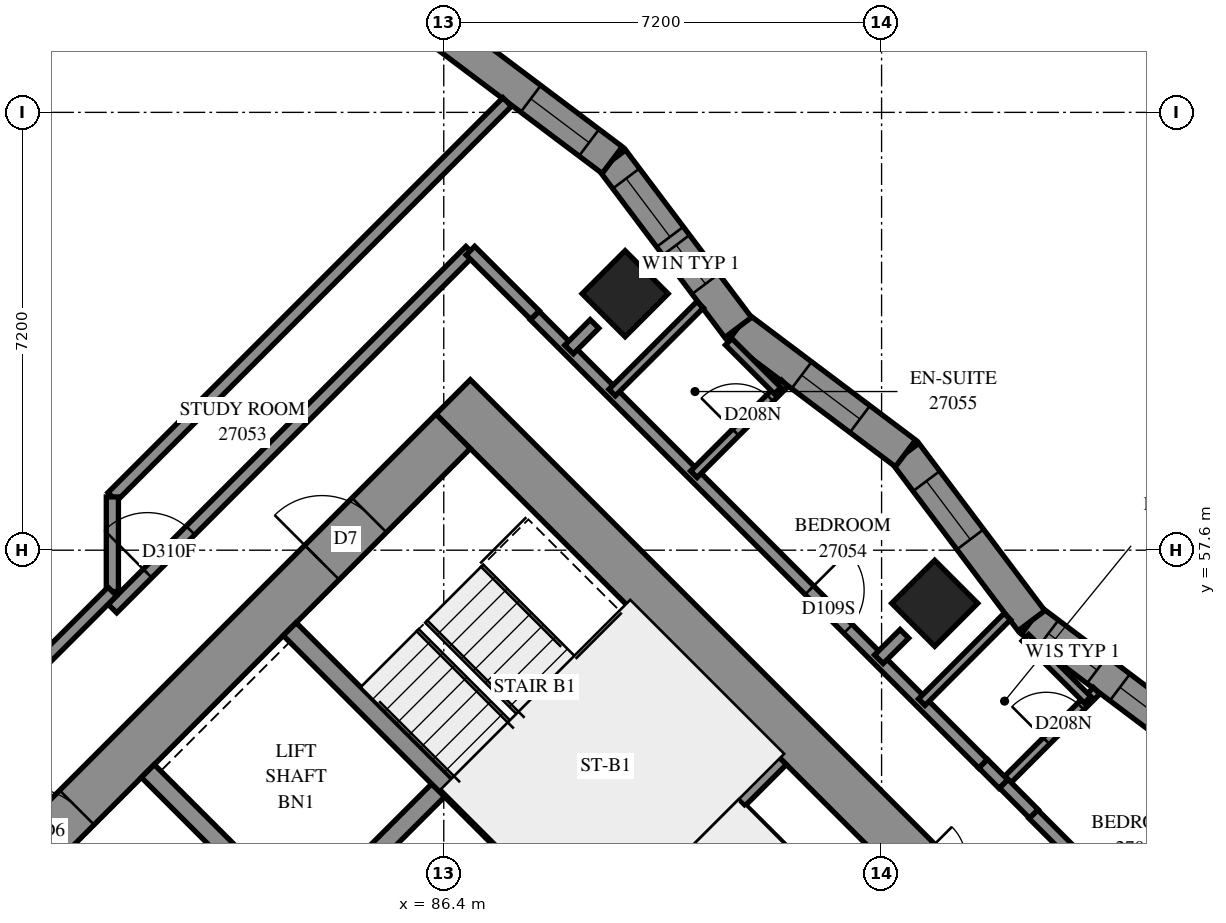
"""IFC4 building model, lengths in metres.
Left out: names, types, materials, properties, quantities, classifications, styles, units other than length and angle.
Written with IfcOpenShell. Run it as: python <this file> out.ifc"""

import sys

from ifc_helpers import new_model, si_unit, direction, frame, frame_2d, origin, origin_2d, place, context, subcontext, project, spatial, polyline, rectangle, outline, extrude, element, fill, save


model = new_model("IFC4")
c1 = context("Model", 3, precision=1e-05, world=origin(), true_north=direction((0.0, 1.0)))
c2 = subcontext(c1, "Body", "Model", "MODEL_VIEW")
j1 = project(units=[si_unit("LENGTHUNIT", "METRE"), si_unit("PLANEANGLEUNIT", "RADIAN")], contexts=[c1])
p1 = place(None, origin())
s1 = spatial("IfcSite", under=j1, at=p1, CompositionType="ELEMENT")
p2 = place(p1, origin())
s2 = spatial("IfcBuilding", under=s1, at=p2, CompositionType="ELEMENT")
p3 = place(p2, frame((0.0, 0.0, 101.6)))
s3 = spatial("IfcBuildingStorey", under=s2, at=p3, CompositionType="ELEMENT", Elevation=101.6)
for number, where, z_axis, x_axis in (
    (1, (89.382, 61.818, 0.0), (0.0, 0.0, 1.0), (0.707, -0.707, 0.0)),
    (2, (94.474, 56.727, 0.0), (0.0, 0.0, 1.0), (0.707, -0.707, 0.0)),
):
    element("IfcColumn", number, at=place(p3, frame(where, z_axis=z_axis, x_axis=x_axis)), inside=s3, PredefinedType="COLUMN", context=c2, shape_type="SweptSolid", body=[
        extrude(rectangle(XDim=1.0, YDim=1.0, at=origin_2d()), origin(), (0.0, 0.0, 1.0), 3.1),
    ])
p4 = place(p3, frame((86.554, 60.121, -0.3), z_axis=(0.0, 0.0, 1.0), x_axis=(0.7071067812, -0.7071067812, 0.0)))
e3 = element("IfcWall", 3, at=p4, inside=s3, PredefinedType="SHEAR", context=c2, shape_type="SweptSolid", body=[
    extrude(rectangle(XDim=16.0, YDim=0.8, at=frame_2d((8.0, 0.0))), origin(), (0.0, 0.0, 1.0), 2.7),
])
p5 = place(p4, frame((10.8, 0.0, 0.3)))
e4 = element("IfcOpeningElement", 4, at=p5, cuts=e3, PredefinedType="OPENING", context=c2, shape_type="SweptSolid", body=[
    extrude(rectangle(XDim=0.8, YDim=2.1, at=frame_2d((0.4, 1.05))), frame((0.0, 0.41, 0.0), z_axis=(0.0, -1.0, 0.0), x_axis=(1.0, 0.0, 0.0)), (0.0, 0.0, 1.0), 0.82),
])
p6 = place(p3, frame((76.372, 49.373, -0.3), z_axis=(0.0, 0.0, 1.0), x_axis=(0.7071067812, 0.7071067812, 0.0)))
e5 = element("IfcWall", 5, at=p6, inside=s3, PredefinedType="SHEAR", context=c2, shape_type="SweptSolid", body=[
    extrude(rectangle(XDim=14.4, YDim=0.8, at=frame_2d((7.2, 0.0))), origin(), (0.0, 0.0, 1.0), 2.7),
])
p7 = place(p6, frame((4.55, 0.0, 0.3)))
e6 = element("IfcOpeningElement", 6, at=p7, cuts=e5, PredefinedType="OPENING", context=c2, shape_type="SweptSolid", body=[
    extrude(rectangle(XDim=1.1, YDim=2.1, at=frame_2d((0.55, 1.05))), frame((0.0, 0.41, 0.0), z_axis=(0.0, -1.0, 0.0), x_axis=(1.0, 0.0, 0.0)), (0.0, 0.0, 1.0), 0.82),
])
p8 = place(p6, frame((11.35, 0.0, 0.3)))
e7 = element("IfcOpeningElement", 7, at=p8, cuts=e5, PredefinedType="OPENING", context=c2, shape_type="SweptSolid", body=[
    extrude(rectangle(XDim=1.1, YDim=2.1, at=frame_2d((0.55, 1.05))), frame((0.0, 0.41, 0.0), z_axis=(0.0, -1.0, 0.0), x_axis=(1.0, 0.0, 0.0)), (0.0, 0.0, 1.0), 0.82),
])
p9 = place(p3, frame((84.079, 51.423, 0.0), z_axis=(0.0, 0.0, 1.0), x_axis=(0.7071219326, 0.7070916295, 0.0)))
e8 = element("IfcWall", 8, at=p9, inside=s3, PredefinedType="SOLIDWALL", context=c2, shape_type="SweptSolid", body=[
    extrude(rectangle(XDim=3.3, YDim=0.3, at=frame_2d((1.65, 0.0))), origin(), (0.0, 0.0, 1.0), 3.1),
])
p10 = place(p3, frame((81.534, 53.969, 0.0), z_axis=(0.0, 0.0, 1.0), x_axis=(0.707103309, -0.7071102534, 0.0)))
e9 = element("IfcWall", 9, at=p10, inside=s3, PredefinedType="SOLIDWALL", context=c2, shape_type="SweptSolid", body=[
    extrude(rectangle(XDim=14.4, YDim=0.3, at=frame_2d((7.2, 0.0))), origin(), (0.0, 0.0, 1.0), 3.1),
])
p11 = place(p10, frame((12.05, 0.0, 0.0)))
e10 = element("IfcOpeningElement", 10, at=p11, cuts=e9, PredefinedType="OPENING", context=c2, shape_type="SweptSolid", body=[
    extrude(rectangle(XDim=1.1, YDim=2.1, at=frame_2d((0.55, 1.05))), frame((0.0, 0.16, 0.0), z_axis=(0.0, -1.0, 0.0), x_axis=(1.0, 0.0, 0.0)), (0.0, 0.0, 1.0), 0.32),
])
p12 = place(p3, frame((83.867, 56.302, 0.0), z_axis=(0.0, 0.0, 1.0), x_axis=(0.7071137256, -0.7070998367, 0.0)))
e11 = element("IfcWall", 11, at=p12, inside=s3, PredefinedType="SOLIDWALL", context=c2, shape_type="SweptSolid", body=[
    extrude(rectangle(XDim=7.2, YDim=0.3, at=frame_2d((3.6, 0.0))), origin(), (0.0, 0.0, 1.0), 3.1),
])
p13 = place(p3, frame((88.958, 51.211, 0.0), z_axis=(0.0, 0.0, 1.0), x_axis=(0.7071067812, 0.7071067812, 0.0)))
e12 = element("IfcWall", 12, at=p13, inside=s3, PredefinedType="SOLIDWALL", context=c2, shape_type="SweptSolid", body=[
    extrude(rectangle(XDim=4.2, YDim=0.3, at=frame_2d((2.1, 0.0))), origin(), (0.0, 0.0, 1.0), 3.1),
])
p14 = place(p3, frame((98.817, 54.369, 0.0), z_axis=(0.0, 0.0, 1.0), x_axis=(-0.7990967254, 0.6012024813, 0.0)))
e13 = element("IfcWall", 13, at=p14, inside=s3, PredefinedType="SOLIDWALL", context=c2, shape_type="SweptSolid", body=[
    extrude(outline(polyline([(-0.039, -0.275), (3.405, -0.275), (3.483, 0.275), (0.039, 0.275), (-0.039, -0.275)])), origin(), (0.0, 0.0, 1.0), 3.1),
])
p15 = place(p14, frame((0.423, 0.0, 0.5)))
e14 = element("IfcOpeningElement", 14, at=p15, cuts=e13, PredefinedType="OPENING", context=c2, shape_type="SweptSolid", body=[
    extrude(rectangle(XDim=1.2, YDim=2.45, at=frame_2d((0.6, 1.225))), frame((0.0, 0.285, 0.0), z_axis=(0.0, -1.0, 0.0), x_axis=(1.0, 0.0, 0.0)), (0.0, 0.0, 1.0), 0.57),
])
p16 = place(p14, frame((2.095, 0.0, 0.45)))
e15 = element("IfcOpeningElement", 15, at=p16, cuts=e13, PredefinedType="OPENING", context=c2, shape_type="SweptSolid", body=[
    extrude(rectangle(XDim=1.0, YDim=2.5, at=frame_2d((0.5, 1.25))), frame((0.0, 0.285, 0.0), z_axis=(0.0, -1.0, 0.0), x_axis=(1.0, 0.0, 0.0)), (0.0, 0.0, 1.0), 0.57),
])
p17 = place(p3, frame((96.064, 56.44, 0.0), z_axis=(0.0, 0.0, 1.0), x_axis=(-0.6012024813, 0.7990967254, 0.0)))
e16 = element("IfcWall", 16, at=p17, inside=s3, PredefinedType="SOLIDWALL", context=c2, shape_type="SweptSolid", body=[
    extrude(outline(polyline([(0.039, -0.275), (3.483, -0.275), (3.405, 0.275), (-0.039, 0.275), (0.039, -0.275)])), origin(), (0.0, 0.0, 1.0), 3.1),
])
p18 = place(p17, frame((1.673, 0.0, 0.5)))
e17 = element("IfcOpeningElement", 17, at=p18, cuts=e16, PredefinedType="OPENING", context=c2, shape_type="SweptSolid", body=[
    extrude(rectangle(XDim=1.2, YDim=2.45, at=frame_2d((0.6, 1.225))), frame((0.0, 0.285, 0.0), z_axis=(0.0, -1.0, 0.0), x_axis=(1.0, 0.0, 0.0)), (0.0, 0.0, 1.0), 0.57),
])
p19 = place(p3, frame((93.994, 59.192, 0.0), z_axis=(0.0, 0.0, 1.0), x_axis=(-0.7990967254, 0.6012024813, 0.0)))
e18 = element("IfcWall", 18, at=p19, inside=s3, PredefinedType="SOLIDWALL", context=c2, shape_type="SweptSolid", body=[
    extrude(outline(polyline([(-0.039, -0.275), (3.405, -0.275), (3.483, 0.275), (0.039, 0.275), (-0.039, -0.275)])), origin(), (0.0, 0.0, 1.0), 3.1),
])
p20 = place(p19, frame((0.938, 0.0, 0.5)))
e19 = element("IfcOpeningElement", 19, at=p20, cuts=e18, PredefinedType="OPENING", context=c2, shape_type="SweptSolid", body=[
    extrude(rectangle(XDim=1.2, YDim=2.45, at=frame_2d((0.6, 1.225))), frame((0.0, 0.285, 0.0), z_axis=(0.0, -1.0, 0.0), x_axis=(1.0, 0.0, 0.0)), (0.0, 0.0, 1.0), 0.57),
])
p21 = place(p3, frame((91.241, 61.263, 0.0), z_axis=(0.0, 0.0, 1.0), x_axis=(-0.6012024813, 0.7990967254, 0.0)))
e20 = element("IfcWall", 20, at=p21, inside=s3, PredefinedType="SOLIDWALL", context=c2, shape_type="SweptSolid", body=[
    extrude(outline(polyline([(0.039, -0.275), (3.483, -0.275), (3.405, 0.275), (-0.039, 0.275), (0.039, -0.275)])), origin(), (0.0, 0.0, 1.0), 3.1),
])
p22 = place(p21, frame((1.865, 0.0, 0.5)))
e21 = element("IfcOpeningElement", 21, at=p22, cuts=e20, PredefinedType="OPENING", context=c2, shape_type="SweptSolid", body=[
    extrude(rectangle(XDim=1.2, YDim=2.45, at=frame_2d((0.6, 1.225))), frame((0.0, 0.285, 0.0), z_axis=(0.0, -1.0, 0.0), x_axis=(1.0, 0.0, 0.0)), (0.0, 0.0, 1.0), 0.57),
])
p23 = place(p21, frame((0.895, 0.0, 0.45)))
e22 = element("IfcOpeningElement", 22, at=p23, cuts=e20, PredefinedType="OPENING", context=c2, shape_type="SweptSolid", body=[
    extrude(rectangle(XDim=0.8, YDim=2.5, at=frame_2d((0.4, 1.25))), frame((0.0, 0.285, 0.0), z_axis=(0.0, -1.0, 0.0), x_axis=(1.0, 0.0, 0.0)), (0.0, 0.0, 1.0), 0.57),
])
p24 = place(p3, frame((89.171, 64.015, 0.0), z_axis=(0.0, 0.0, 1.0), x_axis=(-0.7990967254, 0.6012024813, 0.0)))
e23 = element("IfcWall", 23, at=p24, inside=s3, PredefinedType="SOLIDWALL", context=c2, shape_type="SweptSolid", body=[
    extrude(outline(polyline([(-0.039, -0.275), (3.405, -0.275), (3.483, 0.275), (0.039, 0.275), (-0.039, -0.275)])), origin(), (0.0, 0.0, 1.0), 3.1),
])
p25 = place(p24, frame((0.477, 0.0, 0.5)))
e24 = element("IfcOpeningElement", 24, at=p25, cuts=e23, PredefinedType="OPENING", context=c2, shape_type="SweptSolid", body=[
    extrude(rectangle(XDim=1.2, YDim=2.45, at=frame_2d((0.6, 1.225))), frame((0.0, 0.285, 0.0), z_axis=(0.0, -1.0, 0.0), x_axis=(1.0, 0.0, 0.0)), (0.0, 0.0, 1.0), 0.57),
])
p26 = place(p3, frame((91.313, 53.354, 0.0), z_axis=(0.0, 0.0, 1.0), x_axis=(0.7071067812, -0.7071067812, 0.0)))
e25 = element("IfcWall", 25, at=p26, inside=s3, PredefinedType="PARTITIONING", context=c2, shape_type="SweptSolid", body=[
    extrude(rectangle(XDim=5.95, YDim=0.15, at=frame_2d((2.975, 0.0))), origin(), (0.0, 0.0, 1.0), 3.1),
])
p27 = place(p3, frame((87.894, 61.461, 0.0), z_axis=(0.0, 0.0, 1.0), x_axis=(0.7071067812, -0.7071067812, 0.0)))
e26 = element("IfcWall", 26, at=p27, inside=s3, PredefinedType="PARTITIONING", context=c2, shape_type="SweptSolid", body=[
    extrude(rectangle(XDim=10.428, YDim=0.2, at=frame_2d((5.214, 0.0))), origin(), (0.0, 0.0, 1.0), 3.1),
])
p28 = place(p27, frame((6.39, 0.0, 0.0)))
e27 = element("IfcOpeningElement", 27, at=p28, cuts=e26, PredefinedType="OPENING", context=c2, shape_type="SweptSolid", body=[
    extrude(rectangle(XDim=0.9, YDim=2.1, at=frame_2d((0.45, 1.05))), frame((0.0, 0.11, 0.0), z_axis=(0.0, -1.0, 0.0), x_axis=(1.0, 0.0, 0.0)), (0.0, 0.0, 1.0), 0.22),
])
p29 = place(p3, frame((80.949, 58.477, 0.0), z_axis=(0.0, 0.0, 1.0), x_axis=(0.7071122255, 0.7071013368, 0.0)))
e28 = element("IfcWall", 28, at=p29, inside=s3, PredefinedType="PARTITIONING", context=c2, shape_type="SweptSolid", body=[
    extrude(rectangle(XDim=9.184, YDim=0.2, at=frame_2d((4.592, 0.0))), origin(), (0.0, 0.0, 1.0), 3.1),
])
p30 = place(p3, frame((80.951, 56.641, 0.0), z_axis=(0.0, 0.0, 1.0), x_axis=(0.7071067812, 0.7071067812, 0.0)))
e29 = element("IfcWall", 29, at=p30, inside=s3, PredefinedType="PARTITIONING", context=c2, shape_type="SweptSolid", body=[
    extrude(rectangle(XDim=8.321, YDim=0.2, at=frame_2d((4.161, 0.0))), origin(), (0.0, 0.0, 1.0), 3.1),
])
p31 = place(p30, frame((0.816, 0.0, 0.0)))
e30 = element("IfcOpeningElement", 30, at=p31, cuts=e29, PredefinedType="OPENING", context=c2, shape_type="SweptSolid", body=[
    extrude(rectangle(XDim=1.0, YDim=2.1, at=frame_2d((0.5, 1.05))), frame((0.0, 0.11, 0.0), z_axis=(0.0, -1.0, 0.0), x_axis=(1.0, 0.0, 0.0)), (0.0, 0.0, 1.0), 0.22),
])
p32 = place(p3, frame((96.097, 53.258, 0.0), z_axis=(0.0, 0.0, 1.0), x_axis=(0.7071067812, -0.7071067812, 0.0)))
e31 = element("IfcWall", 31, at=p32, inside=s3, PredefinedType="PARTITIONING", context=c2, shape_type="SweptSolid", body=[
    extrude(rectangle(XDim=5.9, YDim=0.2, at=frame_2d((2.95, 0.0))), origin(), (0.0, 0.0, 1.0), 3.1),
])
p33 = place(p32, frame((2.006, 0.0, 0.0)))
e32 = element("IfcOpeningElement", 32, at=p33, cuts=e31, PredefinedType="OPENING", context=c2, shape_type="SweptSolid", body=[
    extrude(rectangle(XDim=0.9, YDim=2.1, at=frame_2d((0.45, 1.05))), frame((0.0, 0.11, 0.0), z_axis=(0.0, -1.0, 0.0), x_axis=(1.0, 0.0, 0.0)), (0.0, 0.0, 1.0), 0.22),
])
p34 = place(p3, frame((95.605, 53.759, 0.0), z_axis=(0.0, 0.0, 1.0), x_axis=(0.7071067812, 0.7071067812, 0.0)))
e33 = element("IfcWall", 33, at=p34, inside=s3, PredefinedType="PARTITIONING", context=c2, shape_type="SweptSolid", body=[
    extrude(rectangle(XDim=2.165, YDim=0.15, at=frame_2d((1.082, 0.0))), origin(), (0.0, 0.0, 1.0), 3.1),
])
p35 = place(p34, frame((0.997, 0.0, 0.0)))
e34 = element("IfcOpeningElement", 34, at=p35, cuts=e33, PredefinedType="OPENING", context=c2, shape_type="SweptSolid", body=[
    extrude(rectangle(XDim=0.8, YDim=2.1, at=frame_2d((0.4, 1.05))), frame((0.0, 0.085, 0.0), z_axis=(0.0, -1.0, 0.0), x_axis=(1.0, 0.0, 0.0)), (0.0, 0.0, 1.0), 0.17),
])
p36 = place(p3, frame((90.513, 58.849, 0.0), z_axis=(0.0, 0.0, 1.0), x_axis=(0.7071067812, 0.7071067812, 0.0)))
e35 = element("IfcWall", 35, at=p36, inside=s3, PredefinedType="PARTITIONING", context=c2, shape_type="SweptSolid", body=[
    extrude(rectangle(XDim=2.113, YDim=0.15, at=frame_2d((1.056, 0.0))), origin(), (0.0, 0.0, 1.0), 3.1),
])
p37 = place(p36, frame((0.972, 0.0, 0.0)))
e36 = element("IfcOpeningElement", 36, at=p37, cuts=e35, PredefinedType="OPENING", context=c2, shape_type="SweptSolid", body=[
    extrude(rectangle(XDim=0.8, YDim=2.1, at=frame_2d((0.4, 1.05))), frame((0.0, 0.085, 0.0), z_axis=(0.0, -1.0, 0.0), x_axis=(1.0, 0.0, 0.0)), (0.0, 0.0, 1.0), 0.17),
])
p38 = place(p3, frame((89.169, 60.193, 0.0), z_axis=(0.0, 0.0, 1.0), x_axis=(0.7076447093, 0.7065684436, 0.0)))
e37 = element("IfcWall", 37, at=p38, inside=s3, PredefinedType="PARTITIONING", context=c2, shape_type="SweptSolid", body=[
    extrude(rectangle(XDim=2.044, YDim=0.15, at=frame_2d((1.022, 0.0))), origin(), (0.0, 0.0, 1.0), 3.1),
])
p39 = place(p3, frame((94.261, 55.101, 0.0), z_axis=(0.0, 0.0, 1.0), x_axis=(0.7065791742, 0.7076339948, 0.0)))
e38 = element("IfcWall", 38, at=p39, inside=s3, PredefinedType="PARTITIONING", context=c2, shape_type="SweptSolid", body=[
    extrude(rectangle(XDim=1.991, YDim=0.15, at=frame_2d((0.995, 0.0))), origin(), (0.0, 0.0, 1.0), 3.1),
])
p40 = place(p3, frame((80.95, 56.92, 0.0), z_axis=(0.0, 0.0, 1.0), x_axis=(0.0, 1.0, 0.0)))
e39 = element("IfcWall", 39, at=p40, inside=s3, PredefinedType="PARTITIONING", context=c2, shape_type="SweptSolid", body=[
    extrude(rectangle(XDim=1.556, YDim=0.2, at=frame_2d((0.778, 0.0))), origin(), (0.0, 0.0, 1.0), 3.1),
])
p41 = place(p3, frame((79.879, 55.851, 0.0), z_axis=(0.0, 0.0, 1.0), x_axis=(0.7071067812, 0.7071067812, 0.0)))
e40 = element("IfcWall", 40, at=p41, inside=s3, PredefinedType="PARTITIONING", context=c2, shape_type="SweptSolid", body=[
    extrude(rectangle(XDim=1.513, YDim=0.2, at=frame_2d((0.757, 0.0))), origin(), (0.0, 0.0, 1.0), 3.1),
])
p42 = place(p3, frame((86.838, 62.526, 0.0), z_axis=(0.0, 0.0, 1.0), x_axis=(0.70777292, -0.7064400143, 0.0)))
e41 = element("IfcWall", 41, at=p42, inside=s3, PredefinedType="PARTITIONING", context=c2, shape_type="SweptSolid", body=[
    extrude(rectangle(XDim=1.5, YDim=0.2, at=frame_2d((0.75, 0.0))), origin(), (0.0, 0.0, 1.0), 3.1),
])
p43 = place(p3, frame((95.966, 56.161, 0.0), z_axis=(0.0, 0.0, 1.0), x_axis=(0.7071413797, -0.707072181, 0.0)))
e42 = element("IfcWall", 42, at=p43, inside=s3, PredefinedType="PARTITIONING", context=c2, shape_type="SweptSolid", body=[
    extrude(rectangle(XDim=1.445, YDim=0.15, at=frame_2d((0.723, 0.0))), origin(), (0.0, 0.0, 1.0), 3.1),
])
p44 = place(p3, frame((91.085, 61.027, 0.0), z_axis=(0.0, 0.0, 1.0), x_axis=(0.7070628028, -0.7071507569, 0.0)))
e43 = element("IfcWall", 43, at=p44, inside=s3, PredefinedType="PARTITIONING", context=c2, shape_type="SweptSolid", body=[
    extrude(rectangle(XDim=1.137, YDim=0.15, at=frame_2d((0.569, 0.0))), origin(), (0.0, 0.0, 1.0), 3.1),
])
p45 = place(p3, frame((95.609, 53.761, 0.0), z_axis=(0.0, 0.0, 1.0), x_axis=(0.7056768426, -0.7085338339, 0.0)))
e44 = element("IfcWall", 44, at=p45, inside=s3, PredefinedType="PARTITIONING", context=c2, shape_type="SweptSolid", body=[
    extrude(rectangle(XDim=0.7, YDim=0.2, at=frame_2d((0.35, 0.0))), origin(), (0.0, 0.0, 1.0), 3.1),
])
for number, where, z_axis, x_axis in (
    (45, (93.555, 55.807, 0.0), (0.0, 0.0, 1.0), (0.709, 0.705, 0.0)),
    (46, (88.461, 60.901, 0.0), (0.0, 0.0, 1.0), (0.705, 0.709, 0.0)),
):
    element("IfcWall", number, at=place(p3, frame(where, z_axis=z_axis, x_axis=x_axis)), inside=s3, PredefinedType="PARTITIONING", context=c2, shape_type="SweptSolid", body=[
        extrude(rectangle(XDim=0.593, YDim=0.2, at=frame_2d((0.296, 0.0))), origin(), (0.0, 0.0, 1.0), 3.1),
    ])
p46 = place(p3, frame((95.271, 54.089, 0.0), z_axis=(0.0, 0.0, 1.0), x_axis=(0.7049801586, -0.7092270271, 0.0)))
e47 = element("IfcWall", 47, at=p46, inside=s3, PredefinedType="PARTITIONING", context=c2, shape_type="SweptSolid", body=[
    extrude(rectangle(XDim=0.471, YDim=0.2, at=frame_2d((0.235, 0.0))), origin(), (0.0, 0.0, 1.0), 3.1),
])
p47 = place(p18, origin())
e48 = element("IfcWindow", 48, at=p47, inside=s3, PartitioningType="SINGLE_PANEL", PredefinedType="WINDOW", context=c2, shape_type="SweptSolid", body=[
    extrude(rectangle(XDim=1.2, YDim=2.45, at=frame_2d((0.6, 1.225))), frame((0.0, 0.155, 0.0), z_axis=(0.0, -1.0, 0.0), x_axis=(1.0, 0.0, 0.0)), (0.0, 0.0, 1.0), 0.06),
])
fill(e17, e48)
p48 = place(p20, origin())
e49 = element("IfcWindow", 49, at=p48, inside=s3, PartitioningType="SINGLE_PANEL", PredefinedType="WINDOW", context=c2, shape_type="SweptSolid", body=[
    extrude(rectangle(XDim=1.2, YDim=2.45, at=frame_2d((0.6, 1.225))), frame((0.0, 0.155, 0.0), z_axis=(0.0, -1.0, 0.0), x_axis=(1.0, 0.0, 0.0)), (0.0, 0.0, 1.0), 0.06),
])
fill(e19, e49)
p49 = place(p22, origin())
e50 = element("IfcWindow", 50, at=p49, inside=s3, PartitioningType="SINGLE_PANEL", PredefinedType="WINDOW", context=c2, shape_type="SweptSolid", body=[
    extrude(rectangle(XDim=1.2, YDim=2.45, at=frame_2d((0.6, 1.225))), frame((0.0, 0.155, 0.0), z_axis=(0.0, -1.0, 0.0), x_axis=(1.0, 0.0, 0.0)), (0.0, 0.0, 1.0), 0.06),
])
fill(e21, e50)
p50 = place(p25, origin())
e51 = element("IfcWindow", 51, at=p50, inside=s3, PartitioningType="SINGLE_PANEL", PredefinedType="WINDOW", context=c2, shape_type="SweptSolid", body=[
    extrude(rectangle(XDim=1.2, YDim=2.45, at=frame_2d((0.6, 1.225))), frame((0.0, 0.155, 0.0), z_axis=(0.0, -1.0, 0.0), x_axis=(1.0, 0.0, 0.0)), (0.0, 0.0, 1.0), 0.06),
])
fill(e24, e51)
p51 = place(p7, origin())
e52 = element("IfcDoor", 52, at=p51, inside=s3, OperationType="DOUBLE_DOOR_SINGLE_SWING", PredefinedType="DOOR", context=c2, shape_type="SweptSolid", body=[
    extrude(rectangle(XDim=1.1, YDim=2.1, at=frame_2d((0.55, 1.05))), frame((0.0, 0.025, 0.0), z_axis=(0.0, -1.0, 0.0), x_axis=(1.0, 0.0, 0.0)), (0.0, 0.0, 1.0), 0.05),
])
fill(e6, e52)
p52 = place(p8, origin())
e53 = element("IfcDoor", 53, at=p52, inside=s3, OperationType="SINGLE_SWING_LEFT", PredefinedType="DOOR", context=c2, shape_type="SweptSolid", body=[
    extrude(rectangle(XDim=1.1, YDim=2.1, at=frame_2d((0.55, 1.05))), frame((0.0, 0.025, 0.0), z_axis=(0.0, -1.0, 0.0), x_axis=(1.0, 0.0, 0.0)), (0.0, 0.0, 1.0), 0.05),
])
fill(e7, e53)
p53 = place(p31, origin())
e54 = element("IfcDoor", 54, at=p53, inside=s3, OperationType="SINGLE_SWING_RIGHT", PredefinedType="DOOR", context=c2, shape_type="SweptSolid", body=[
    extrude(rectangle(XDim=1.0, YDim=2.1, at=frame_2d((0.5, 1.05))), frame((0.0, 0.025, 0.0), z_axis=(0.0, -1.0, 0.0), x_axis=(1.0, 0.0, 0.0)), (0.0, 0.0, 1.0), 0.05),
])
fill(e30, e54)
p54 = place(p28, origin())
e55 = element("IfcDoor", 55, at=p54, inside=s3, OperationType="SINGLE_SWING_LEFT", PredefinedType="DOOR", context=c2, shape_type="SweptSolid", body=[
    extrude(rectangle(XDim=0.9, YDim=2.1, at=frame_2d((0.45, 1.05))), frame((0.0, 0.025, 0.0), z_axis=(0.0, -1.0, 0.0), x_axis=(1.0, 0.0, 0.0)), (0.0, 0.0, 1.0), 0.05),
])
fill(e27, e55)
p55 = place(p37, origin())
e56 = element("IfcDoor", 56, at=p55, inside=s3, OperationType="SINGLE_SWING_RIGHT", PredefinedType="DOOR", context=c2, shape_type="SweptSolid", body=[
    extrude(rectangle(XDim=0.8, YDim=2.1, at=frame_2d((0.4, 1.05))), frame((0.0, 0.025, 0.0), z_axis=(0.0, -1.0, 0.0), x_axis=(1.0, 0.0, 0.0)), (0.0, 0.0, 1.0), 0.05),
])
fill(e36, e56)
p56 = place(p35, origin())
e57 = element("IfcDoor", 57, at=p56, inside=s3, OperationType="SINGLE_SWING_RIGHT", PredefinedType="DOOR", context=c2, shape_type="SweptSolid", body=[
    extrude(rectangle(XDim=0.8, YDim=2.1, at=frame_2d((0.4, 1.05))), frame((0.0, 0.025, 0.0), z_axis=(0.0, -1.0, 0.0), x_axis=(1.0, 0.0, 0.0)), (0.0, 0.0, 1.0), 0.05),
])
fill(e34, e57)
p57 = place(p15, origin())
e58 = element("IfcWindow", 58, at=p57, inside=s3, PartitioningType="SINGLE_PANEL", PredefinedType="WINDOW", context=c2, shape_type="SweptSolid", body=[
    extrude(rectangle(XDim=1.2, YDim=2.45, at=frame_2d((0.6, 1.225))), frame((0.0, 0.155, 0.0), z_axis=(0.0, -1.0, 0.0), x_axis=(1.0, 0.0, 0.0)), (0.0, 0.0, 1.0), 0.06),
])
fill(e14, e58)
p58 = place(p16, origin())
e59 = element("IfcWindow", 59, at=p58, inside=s3, PartitioningType="SINGLE_PANEL", PredefinedType="WINDOW", context=c2, shape_type="SweptSolid", body=[
    extrude(rectangle(XDim=1.0, YDim=2.5, at=frame_2d((0.5, 1.25))), frame((0.0, 0.155, 0.0), z_axis=(0.0, -1.0, 0.0), x_axis=(1.0, 0.0, 0.0)), (0.0, 0.0, 1.0), 0.06),
])
fill(e15, e59)
p59 = place(p23, origin())
e60 = element("IfcWindow", 60, at=p59, inside=s3, PartitioningType="SINGLE_PANEL", PredefinedType="WINDOW", context=c2, shape_type="SweptSolid", body=[
    extrude(rectangle(XDim=0.8, YDim=2.5, at=frame_2d((0.4, 1.25))), frame((0.0, 0.155, 0.0), z_axis=(0.0, -1.0, 0.0), x_axis=(1.0, 0.0, 0.0)), (0.0, 0.0, 1.0), 0.06),
])
fill(e22, e60)
save(model, sys.argv[1])
